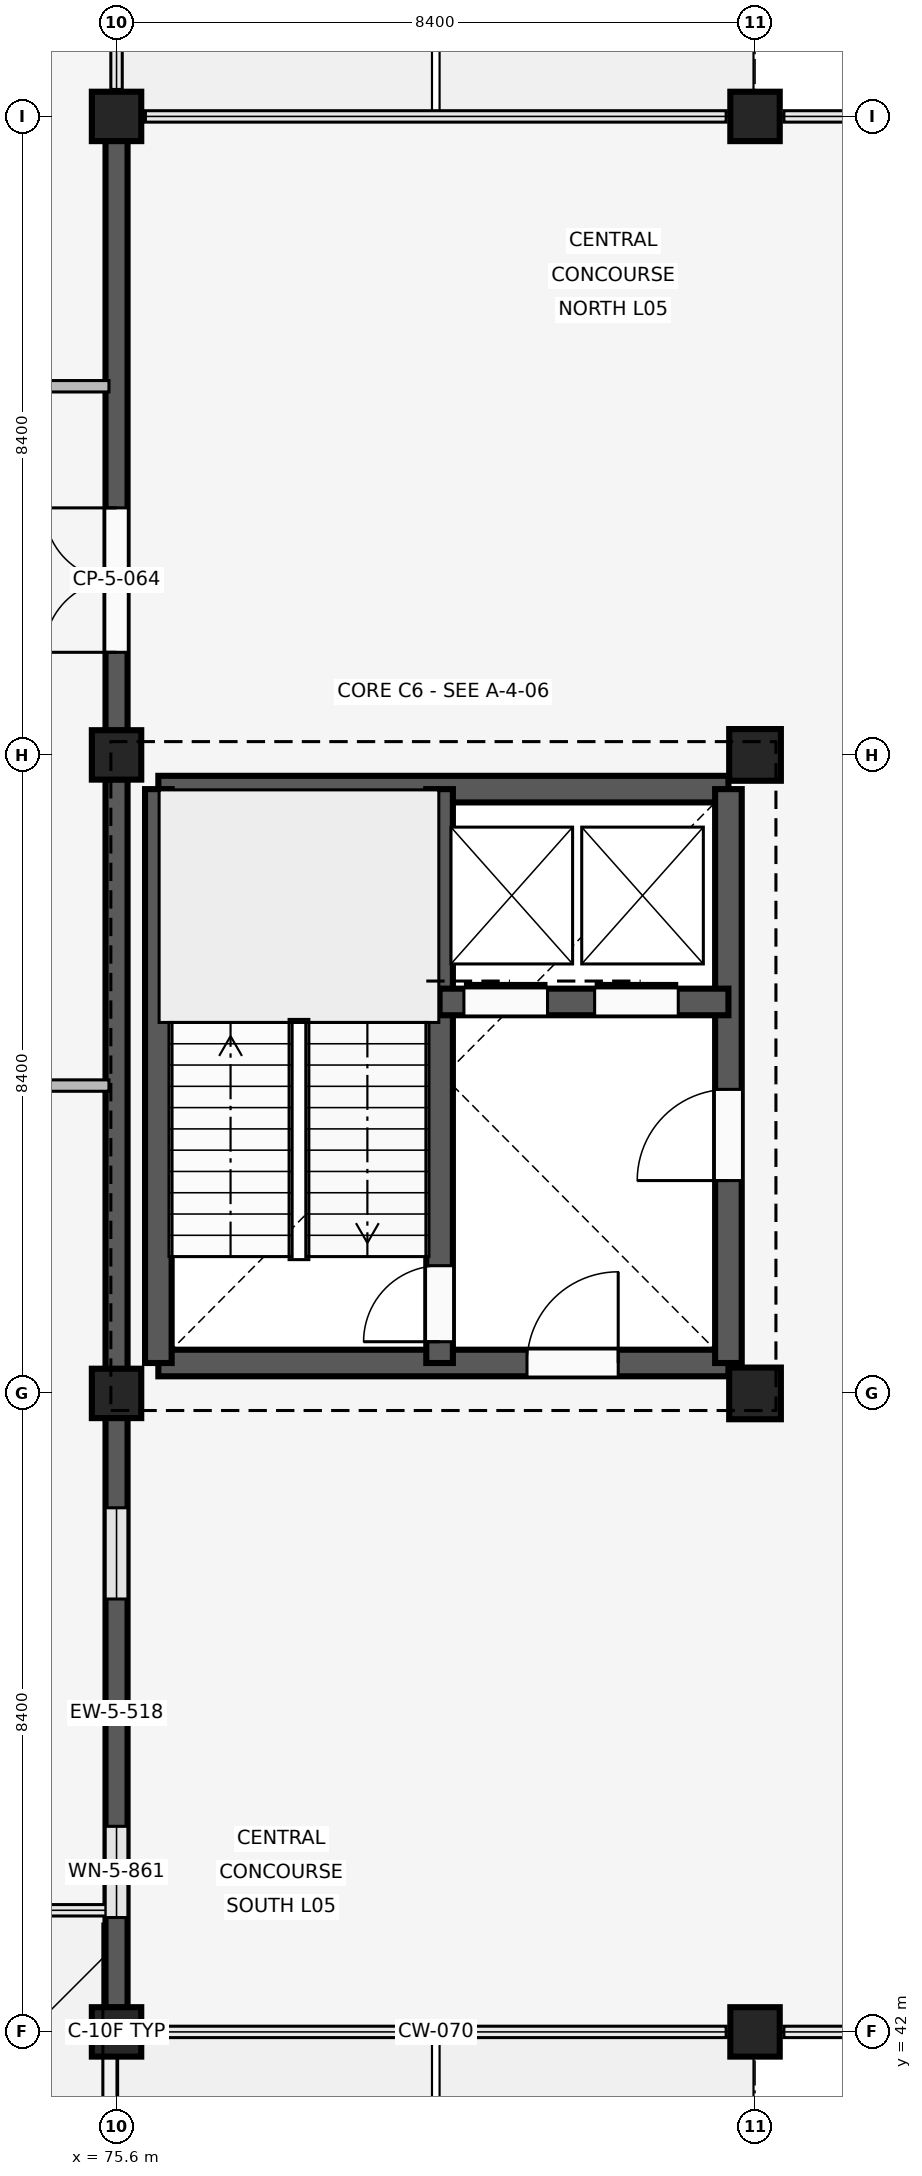
"""IFC4 building model, lengths in metres.
Left out: names, types, materials, properties, quantities, classifications, styles, units other than length and angle.
Written with IfcOpenShell. Run it as: python <this file> out.ifc"""

import sys

from ifc_helpers import new_model, si_unit, direction, frame, frame_2d, origin, origin_2d, place, context, subcontext, project, spatial, rectangle, extrude, element, fill, save


model = new_model("IFC4")
c1 = context("Model", 3, precision=1e-05, world=origin(), true_north=direction((0.0, 1.0)))
c2 = subcontext(c1, "Body", "Model", "MODEL_VIEW")
j1 = project(units=[si_unit("LENGTHUNIT", "METRE"), si_unit("PLANEANGLEUNIT", "RADIAN")], contexts=[c1])
p1 = place(None, origin())
s1 = spatial("IfcSite", under=j1, at=p1, CompositionType="ELEMENT")
p2 = place(p1, origin())
s2 = spatial("IfcBuilding", under=s1, at=p2, CompositionType="ELEMENT")
p3 = place(p2, frame((0.0, 0.0, 20.4)))
s3 = spatial("IfcBuildingStorey", under=s2, at=p3, CompositionType="ELEMENT", Elevation=20.4)
for number, where, z_axis, x_axis in (
    (1, (75.6, 42.0, 0.0), (0.0, 0.0, 1.0), (1.0, 0.0, 0.0)),
    (2, (75.6, 50.4, 0.0), (0.0, 0.0, 1.0), (1.0, 0.0, 0.0)),
    (3, (75.6, 58.8, 0.0), (0.0, 0.0, 1.0), (1.0, 0.0, 0.0)),
    (4, (75.6, 67.2, 0.0), (0.0, 0.0, 1.0), (1.0, 0.0, 0.0)),
    (5, (84.0, 42.0, 0.0), (0.0, 0.0, 1.0), (1.0, 0.0, 0.0)),
):
    element("IfcColumn", number, at=place(p3, frame(where, z_axis=z_axis, x_axis=x_axis)), inside=s3, PredefinedType="COLUMN", context=c2, shape_type="SweptSolid", body=[
        extrude(rectangle(XDim=0.65, YDim=0.65, at=origin_2d()), origin(), (0.0, 0.0, 1.0), 4.2),
    ])
for number, where, z_axis, x_axis in (
    (6, (84.0, 50.4, 0.0), (0.0, 0.0, 1.0), (1.0, 0.0, 0.0)),
    (7, (84.0, 58.8, 0.0), (0.0, 0.0, 1.0), (1.0, 0.0, 0.0)),
):
    element("IfcColumn", number, at=place(p3, frame(where, z_axis=z_axis, x_axis=x_axis)), inside=s3, PredefinedType="COLUMN", context=c2, shape_type="SweptSolid", body=[
        extrude(rectangle(XDim=0.68, YDim=0.68, at=origin_2d()), origin(), (0.0, 0.0, 1.0), 4.2),
    ])
p4 = place(p3, frame((84.0, 67.2, 0.0), z_axis=(0.0, 0.0, 1.0), x_axis=(1.0, 0.0, 0.0)))
e8 = element("IfcColumn", 8, at=p4, inside=s3, PredefinedType="COLUMN", context=c2, shape_type="SweptSolid", body=[
    extrude(rectangle(XDim=0.65, YDim=0.65, at=origin_2d()), origin(), (0.0, 0.0, 1.0), 4.2),
])
p5 = place(p3, frame((75.6, 42.32, 0.0), z_axis=(0.0, 0.0, 1.0), x_axis=(0.0, 1.0, 0.0)))
e9 = element("IfcWall", 9, at=p5, inside=s3, PredefinedType="SOLIDWALL", context=c2, shape_type="SweptSolid", body=[
    extrude(rectangle(XDim=7.76, YDim=0.29, at=frame_2d((3.88, 0.0))), origin(), (0.0, 0.0, 1.0), 3.34),
])
p6 = place(p5, frame((1.185, 0.0, 0.85)))
e10 = element("IfcOpeningElement", 10, at=p6, cuts=e9, PredefinedType="OPENING", context=c2, shape_type="SweptSolid", body=[
    extrude(rectangle(XDim=1.2, YDim=1.55, at=frame_2d((0.6, 0.775))), frame((0.0, 0.155, 0.0), z_axis=(0.0, -1.0, 0.0), x_axis=(1.0, 0.0, 0.0)), (0.0, 0.0, 1.0), 0.31),
])
p7 = place(p5, frame((5.375, 0.0, 0.85)))
e11 = element("IfcOpeningElement", 11, at=p7, cuts=e9, PredefinedType="OPENING", context=c2, shape_type="SweptSolid", body=[
    extrude(rectangle(XDim=1.2, YDim=1.55, at=frame_2d((0.6, 0.775))), frame((0.0, 0.155, 0.0), z_axis=(0.0, -1.0, 0.0), x_axis=(1.0, 0.0, 0.0)), (0.0, 0.0, 1.0), 0.31),
])
p8 = place(p3, frame((75.6, 50.72, 0.0), z_axis=(0.0, 0.0, 1.0), x_axis=(0.0, 1.0, 0.0)))
e12 = element("IfcWall", 12, at=p8, inside=s3, PredefinedType="SOLIDWALL", context=c2, shape_type="SweptSolid", body=[
    extrude(rectangle(XDim=7.76, YDim=0.29, at=frame_2d((3.88, 0.0))), origin(), (0.0, 0.0, 1.0), 3.34),
])
p9 = place(p3, frame((75.6, 59.12, 0.0), z_axis=(0.0, 0.0, 1.0), x_axis=(0.0, 1.0, 0.0)))
e13 = element("IfcWall", 13, at=p9, inside=s3, PredefinedType="SOLIDWALL", context=c2, shape_type="SweptSolid", body=[
    extrude(rectangle(XDim=7.76, YDim=0.29, at=frame_2d((3.88, 0.0))), origin(), (0.0, 0.0, 1.0), 3.34),
])
p10 = place(p9, frame((1.03, 0.0, 0.0)))
e14 = element("IfcOpeningElement", 14, at=p10, cuts=e13, PredefinedType="OPENING", context=c2, shape_type="SweptSolid", body=[
    extrude(rectangle(XDim=1.9, YDim=2.4, at=frame_2d((0.95, 1.2))), frame((0.0, 0.155, 0.0), z_axis=(0.0, -1.0, 0.0), x_axis=(1.0, 0.0, 0.0)), (0.0, 0.0, 1.0), 0.31),
])
p11 = place(p3, frame((76.15, 50.8, 0.0), z_axis=(0.0, 0.0, 1.0), x_axis=(1.0, 0.0, 0.0)))
e15 = element("IfcWall", 15, at=p11, inside=s3, PredefinedType="SHEAR", context=c2, shape_type="SweptSolid", body=[
    extrude(rectangle(XDim=7.5, YDim=0.35, at=frame_2d((3.75, 0.0))), origin(), (0.0, 0.0, 1.0), 3.92),
])
p12 = place(p11, frame((4.85, 0.0, 0.0)))
e16 = element("IfcOpeningElement", 16, at=p12, cuts=e15, PredefinedType="OPENING", context=c2, shape_type="SweptSolid", body=[
    extrude(rectangle(XDim=1.2, YDim=2.2, at=frame_2d((0.6, 1.1))), frame((0.0, 0.185, 0.0), z_axis=(0.0, -1.0, 0.0), x_axis=(1.0, 0.0, 0.0)), (0.0, 0.0, 1.0), 0.37),
])
p13 = place(p3, frame((76.15, 58.35, 0.0), z_axis=(0.0, 0.0, 1.0), x_axis=(1.0, 0.0, 0.0)))
e17 = element("IfcWall", 17, at=p13, inside=s3, PredefinedType="SHEAR", context=c2, shape_type="SweptSolid", body=[
    extrude(rectangle(XDim=7.5, YDim=0.35, at=frame_2d((3.75, 0.0))), origin(), (0.0, 0.0, 1.0), 3.92),
])
p14 = place(p3, frame((76.15, 50.8, 0.0), z_axis=(0.0, 0.0, 1.0), x_axis=(0.0, 1.0, 0.0)))
e18 = element("IfcWall", 18, at=p14, inside=s3, PredefinedType="SHEAR", context=c2, shape_type="SweptSolid", body=[
    extrude(rectangle(XDim=7.55, YDim=0.35, at=frame_2d((3.775, 0.0))), origin(), (0.0, 0.0, 1.0), 3.92),
])
p15 = place(p3, frame((83.65, 50.8, 0.0), z_axis=(0.0, 0.0, 1.0), x_axis=(0.0, 1.0, 0.0)))
e19 = element("IfcWall", 19, at=p15, inside=s3, PredefinedType="SHEAR", context=c2, shape_type="SweptSolid", body=[
    extrude(rectangle(XDim=7.55, YDim=0.35, at=frame_2d((3.775, 0.0))), origin(), (0.0, 0.0, 1.0), 3.92),
])
p16 = place(p15, frame((2.4, 0.0, 0.0)))
e20 = element("IfcOpeningElement", 20, at=p16, cuts=e19, PredefinedType="OPENING", context=c2, shape_type="SweptSolid", body=[
    extrude(rectangle(XDim=1.2, YDim=2.2, at=frame_2d((0.6, 1.1))), frame((0.0, 0.185, 0.0), z_axis=(0.0, -1.0, 0.0), x_axis=(1.0, 0.0, 0.0)), (0.0, 0.0, 1.0), 0.37),
])
p17 = place(p3, frame((79.85, 50.8, 0.0), z_axis=(0.0, 0.0, 1.0), x_axis=(0.0, 1.0, 0.0)))
e21 = element("IfcWall", 21, at=p17, inside=s3, PredefinedType="SHEAR", context=c2, shape_type="SweptSolid", body=[
    extrude(rectangle(XDim=7.55, YDim=0.35, at=frame_2d((3.775, 0.0))), origin(), (0.0, 0.0, 1.0), 3.92),
])
p18 = place(p17, frame((0.28, 0.0, 0.0)))
e22 = element("IfcOpeningElement", 22, at=p18, cuts=e21, PredefinedType="OPENING", context=c2, shape_type="SweptSolid", body=[
    extrude(rectangle(XDim=1.0, YDim=2.15, at=frame_2d((0.5, 1.075))), frame((0.0, 0.185, 0.0), z_axis=(0.0, -1.0, 0.0), x_axis=(1.0, 0.0, 0.0)), (0.0, 0.0, 1.0), 0.37),
])
p19 = place(p3, frame((79.85, 55.55, 0.0), z_axis=(0.0, 0.0, 1.0), x_axis=(1.0, 0.0, 0.0)))
e23 = element("IfcWall", 23, at=p19, inside=s3, PredefinedType="SHEAR", context=c2, shape_type="SweptSolid", body=[
    extrude(rectangle(XDim=3.8, YDim=0.35, at=frame_2d((1.9, 0.0))), origin(), (0.0, 0.0, 1.0), 3.92),
])
p20 = place(p19, frame((0.32, 0.0, 0.0)))
e24 = element("IfcOpeningElement", 24, at=p20, cuts=e23, PredefinedType="OPENING", context=c2, shape_type="SweptSolid", body=[
    extrude(rectangle(XDim=1.1, YDim=2.15, at=frame_2d((0.55, 1.075))), frame((0.0, 0.185, 0.0), z_axis=(0.0, -1.0, 0.0), x_axis=(1.0, 0.0, 0.0)), (0.0, 0.0, 1.0), 0.37),
])
p21 = place(p19, frame((2.04, 0.0, 0.0)))
e25 = element("IfcOpeningElement", 25, at=p21, cuts=e23, PredefinedType="OPENING", context=c2, shape_type="SweptSolid", body=[
    extrude(rectangle(XDim=1.1, YDim=2.15, at=frame_2d((0.55, 1.075))), frame((0.0, 0.185, 0.0), z_axis=(0.0, -1.0, 0.0), x_axis=(1.0, 0.0, 0.0)), (0.0, 0.0, 1.0), 0.37),
])
p22 = place(p3, frame((59.7, 54.45, 0.0), z_axis=(0.0, 0.0, 1.0), x_axis=(1.0, 0.0, 0.0)))
e26 = element("IfcWall", 26, at=p22, inside=s3, PredefinedType="PARTITIONING", context=c2, shape_type="SweptSolid", body=[
    extrude(rectangle(XDim=15.8, YDim=0.15, at=frame_2d((7.9, 0.0))), origin(), (0.0, 0.0, 1.0), 3.49),
])
p23 = place(p22, frame((2.6, 0.0, 0.0)))
e27 = element("IfcOpeningElement", 27, at=p23, cuts=e26, PredefinedType="OPENING", context=c2, shape_type="SweptSolid", body=[
    extrude(rectangle(XDim=1.0, YDim=2.15, at=frame_2d((0.5, 1.075))), frame((0.0, 0.085, 0.0), z_axis=(0.0, -1.0, 0.0), x_axis=(1.0, 0.0, 0.0)), (0.0, 0.0, 1.0), 0.17),
])
p24 = place(p3, frame((59.7, 63.65, 0.0), z_axis=(0.0, 0.0, 1.0), x_axis=(1.0, 0.0, 0.0)))
e28 = element("IfcWall", 28, at=p24, inside=s3, PredefinedType="PARTITIONING", context=c2, shape_type="SweptSolid", body=[
    extrude(rectangle(XDim=15.8, YDim=0.15, at=frame_2d((7.9, 0.0))), origin(), (0.0, 0.0, 1.0), 3.49),
])
p25 = place(p24, frame((2.6, 0.0, 0.0)))
e29 = element("IfcOpeningElement", 29, at=p25, cuts=e28, PredefinedType="OPENING", context=c2, shape_type="SweptSolid", body=[
    extrude(rectangle(XDim=1.05, YDim=2.2, at=frame_2d((0.525, 1.1))), frame((0.0, 0.085, 0.0), z_axis=(0.0, -1.0, 0.0), x_axis=(1.0, 0.0, 0.0)), (0.0, 0.0, 1.0), 0.17),
])
p26 = place(p6, origin())
e30 = element("IfcWindow", 30, at=p26, inside=s3, PartitioningType="SINGLE_PANEL", PredefinedType="WINDOW", context=c2, shape_type="SweptSolid", body=[
    extrude(rectangle(XDim=1.2, YDim=1.55, at=frame_2d((0.6, 0.775))), frame((0.0, 0.03, 0.0), z_axis=(0.0, -1.0, 0.0), x_axis=(1.0, 0.0, 0.0)), (0.0, 0.0, 1.0), 0.06),
])
fill(e10, e30)
p27 = place(p7, origin())
e31 = element("IfcWindow", 31, at=p27, inside=s3, PartitioningType="SINGLE_PANEL", PredefinedType="WINDOW", context=c2, shape_type="SweptSolid", body=[
    extrude(rectangle(XDim=1.2, YDim=1.55, at=frame_2d((0.6, 0.775))), frame((0.0, 0.03, 0.0), z_axis=(0.0, -1.0, 0.0), x_axis=(1.0, 0.0, 0.0)), (0.0, 0.0, 1.0), 0.06),
])
fill(e11, e31)
p28 = place(p10, origin())
e32 = element("IfcDoor", 32, at=p28, inside=s3, OperationType="DOUBLE_SWING_LEFT", PredefinedType="DOOR", context=c2, shape_type="SweptSolid", body=[
    extrude(rectangle(XDim=1.9, YDim=2.4, at=frame_2d((0.95, 1.2))), frame((0.0, 0.025, 0.0), z_axis=(0.0, -1.0, 0.0), x_axis=(1.0, 0.0, 0.0)), (0.0, 0.0, 1.0), 0.05),
])
fill(e14, e32)
p29 = place(p16, origin())
e33 = element("IfcDoor", 33, at=p29, inside=s3, OperationType="SINGLE_SWING_LEFT", PredefinedType="DOOR", context=c2, shape_type="SweptSolid", body=[
    extrude(rectangle(XDim=1.2, YDim=2.2, at=frame_2d((0.6, 1.1))), frame((0.0, 0.025, 0.0), z_axis=(0.0, -1.0, 0.0), x_axis=(1.0, 0.0, 0.0)), (0.0, 0.0, 1.0), 0.05),
])
fill(e20, e33)
p30 = place(p12, origin())
e34 = element("IfcDoor", 34, at=p30, inside=s3, OperationType="SINGLE_SWING_RIGHT", PredefinedType="DOOR", context=c2, shape_type="SweptSolid", body=[
    extrude(rectangle(XDim=1.2, YDim=2.2, at=frame_2d((0.6, 1.1))), frame((0.0, 0.025, 0.0), z_axis=(0.0, -1.0, 0.0), x_axis=(1.0, 0.0, 0.0)), (0.0, 0.0, 1.0), 0.05),
])
fill(e16, e34)
p31 = place(p18, origin())
e35 = element("IfcDoor", 35, at=p31, inside=s3, OperationType="SINGLE_SWING_LEFT", PredefinedType="DOOR", context=c2, shape_type="SweptSolid", body=[
    extrude(rectangle(XDim=1.0, YDim=2.15, at=frame_2d((0.5, 1.075))), frame((0.0, 0.025, 0.0), z_axis=(0.0, -1.0, 0.0), x_axis=(1.0, 0.0, 0.0)), (0.0, 0.0, 1.0), 0.05),
])
fill(e22, e35)
p32 = place(p20, origin())
e36 = element("IfcDoor", 36, at=p32, inside=s3, OperationType="SLIDING_TO_LEFT", PredefinedType="DOOR", context=c2, shape_type="SweptSolid", body=[
    extrude(rectangle(XDim=1.1, YDim=2.15, at=frame_2d((0.55, 1.075))), frame((0.0, 0.025, 0.0), z_axis=(0.0, -1.0, 0.0), x_axis=(1.0, 0.0, 0.0)), (0.0, 0.0, 1.0), 0.05),
])
fill(e24, e36)
p33 = place(p21, origin())
e37 = element("IfcDoor", 37, at=p33, inside=s3, OperationType="SLIDING_TO_LEFT", PredefinedType="DOOR", context=c2, shape_type="SweptSolid", body=[
    extrude(rectangle(XDim=1.1, YDim=2.15, at=frame_2d((0.55, 1.075))), frame((0.0, 0.025, 0.0), z_axis=(0.0, -1.0, 0.0), x_axis=(1.0, 0.0, 0.0)), (0.0, 0.0, 1.0), 0.05),
])
fill(e25, e37)
save(model, sys.argv[1])
